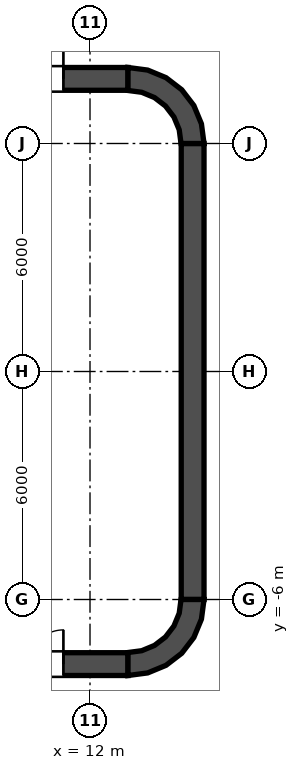
"""IFC4 building model, lengths in metres.
Left out: names, types, materials, properties, quantities, classifications, styles, units other than length and angle.
Written with IfcOpenShell. Run it as: python <this file> out.ifc"""

import sys

from ifc_helpers import new_model, si_unit, direction, frame, frame_2d, origin, place, context, subcontext, project, spatial, polyline, rectangle, outline, extrude, element, fill, save


model = new_model("IFC4")
c1 = context("Model", 3, precision=1e-05, world=origin(), true_north=direction((0.0, 1.0)))
c2 = subcontext(c1, "Body", "Model", "MODEL_VIEW")
j1 = project(units=[si_unit("LENGTHUNIT", "METRE"), si_unit("PLANEANGLEUNIT", "RADIAN")], contexts=[c1])
p1 = place(None, origin())
s1 = spatial("IfcSite", under=j1, at=p1, CompositionType="ELEMENT")
p2 = place(p1, origin())
s2 = spatial("IfcBuilding", under=s1, at=p2, CompositionType="ELEMENT")
p3 = place(p2, frame((0.0, 0.0, 44.0)))
s3 = spatial("IfcBuildingStorey", under=s2, at=p3, CompositionType="ELEMENT", Elevation=44.0)
p4 = place(p3, frame((-13.0, 7.7, 0.0), z_axis=(0.0, 0.0, 1.0), x_axis=(1.0, 0.0, 0.0)))
e1 = element("IfcWall", 1, at=p4, inside=s3, PredefinedType="SHEAR", context=c2, shape_type="SweptSolid", body=[
    extrude(rectangle(XDim=26.0, YDim=0.6, at=frame_2d((13.0, 0.0))), origin(), (0.0, 0.0, 1.0), 6.4),
])
p5 = place(p4, frame((1.7, 0.0, 0.0)))
e2 = element("IfcOpeningElement", 2, at=p5, cuts=e1, PredefinedType="OPENING", context=c2, shape_type="SweptSolid", body=[
    extrude(rectangle(XDim=1.8, YDim=2.1, at=frame_2d((0.9, 1.05))), frame((0.0, 0.3, 0.0), z_axis=(0.0, -1.0, 0.0), x_axis=(1.0, 0.0, 0.0)), (0.0, 0.0, 1.0), 0.6),
])
p6 = place(p4, frame((22.5, 0.0, 0.0)))
e3 = element("IfcOpeningElement", 3, at=p6, cuts=e1, PredefinedType="OPENING", context=c2, shape_type="SweptSolid", body=[
    extrude(rectangle(XDim=1.8, YDim=2.1, at=frame_2d((0.9, 1.05))), frame((0.0, 0.3, 0.0), z_axis=(0.0, -1.0, 0.0), x_axis=(1.0, 0.0, 0.0)), (0.0, 0.0, 1.0), 0.6),
])
p7 = place(p3, frame((-13.0, -7.7, 0.0), z_axis=(0.0, 0.0, 1.0), x_axis=(1.0, 0.0, 0.0)))
e4 = element("IfcWall", 4, at=p7, inside=s3, PredefinedType="SHEAR", context=c2, shape_type="SweptSolid", body=[
    extrude(rectangle(XDim=26.0, YDim=0.6, at=frame_2d((13.0, 0.0))), origin(), (0.0, 0.0, 1.0), 6.4),
])
p8 = place(p7, frame((1.7, 0.0, 0.0)))
e5 = element("IfcOpeningElement", 5, at=p8, cuts=e4, PredefinedType="OPENING", context=c2, shape_type="SweptSolid", body=[
    extrude(rectangle(XDim=1.8, YDim=2.1, at=frame_2d((0.9, 1.05))), frame((0.0, 0.3, 0.0), z_axis=(0.0, -1.0, 0.0), x_axis=(1.0, 0.0, 0.0)), (0.0, 0.0, 1.0), 0.6),
])
p9 = place(p7, frame((22.5, 0.0, 0.0)))
e6 = element("IfcOpeningElement", 6, at=p9, cuts=e4, PredefinedType="OPENING", context=c2, shape_type="SweptSolid", body=[
    extrude(rectangle(XDim=1.8, YDim=2.1, at=frame_2d((0.9, 1.05))), frame((0.0, 0.3, 0.0), z_axis=(0.0, -1.0, 0.0), x_axis=(1.0, 0.0, 0.0)), (0.0, 0.0, 1.0), 0.6),
])
p10 = place(p3, frame((14.7, -6.0, 0.0), z_axis=(0.0, 0.0, 1.0), x_axis=(0.0, 1.0, 0.0)))
e7 = element("IfcWall", 7, at=p10, inside=s3, PredefinedType="SHEAR", context=c2, shape_type="SweptSolid", body=[
    extrude(rectangle(XDim=12.0, YDim=0.6, at=frame_2d((6.0, 0.0))), origin(), (0.0, 0.0, 1.0), 6.4),
])
p11 = place(p3, origin())
e8 = element("IfcWall", 8, at=p11, inside=s3, PredefinedType="SHEAR", context=c2, shape_type="SweptSolid", body=[
    extrude(outline(polyline([(13.0, 8.0), (13.0, 7.395), (13.361, 7.347), (13.698, 7.208), (13.986, 6.986), (14.208, 6.698), (14.347, 6.361), (14.395, 6.0), (15.0, 6.0), (14.932, 6.518), (14.732, 7.0), (14.414, 7.414), (14.0, 7.732), (13.518, 7.932), (13.0, 8.0)])), origin(), (0.0, 0.0, 1.0), 6.4),
])
e9 = element("IfcWall", 9, at=p11, inside=s3, PredefinedType="SHEAR", context=c2, shape_type="SweptSolid", body=[
    extrude(outline(polyline([(15.0, -6.0), (14.395, -6.0), (14.347, -6.361), (14.208, -6.698), (13.986, -6.986), (13.698, -7.208), (13.361, -7.347), (13.0, -7.395), (13.0, -8.0), (13.518, -7.932), (14.0, -7.732), (14.414, -7.414), (14.732, -7.0), (14.932, -6.518), (15.0, -6.0)])), origin(), (0.0, 0.0, 1.0), 6.4),
])
p12 = place(p3, frame((11.8, -7.4, 0.0), z_axis=(0.0, 0.0, 1.0), x_axis=(0.0, 1.0, 0.0)))
e10 = element("IfcWall", 10, at=p12, inside=s3, PredefinedType="SOLIDWALL", context=c2, shape_type="SweptSolid", body=[
    extrude(rectangle(XDim=14.8, YDim=0.4, at=frame_2d((7.4, 0.0))), origin(), (0.0, 0.0, 1.0), 6.25),
])
p13 = place(p12, frame((13.552, 0.0, 0.0)))
e11 = element("IfcOpeningElement", 11, at=p13, cuts=e10, PredefinedType="OPENING", context=c2, shape_type="SweptSolid", body=[
    extrude(rectangle(XDim=0.9, YDim=2.1, at=frame_2d((0.45, 1.05))), frame((0.0, 0.2, 0.0), z_axis=(0.0, -1.0, 0.0), x_axis=(1.0, 0.0, 0.0)), (0.0, 0.0, 1.0), 0.4),
])
p14 = place(p12, frame((0.347, 0.0, 0.0)))
e12 = element("IfcOpeningElement", 12, at=p14, cuts=e10, PredefinedType="OPENING", context=c2, shape_type="SweptSolid", body=[
    extrude(rectangle(XDim=0.9, YDim=2.1, at=frame_2d((0.45, 1.05))), frame((0.0, 0.2, 0.0), z_axis=(0.0, -1.0, 0.0), x_axis=(1.0, 0.0, 0.0)), (0.0, 0.0, 1.0), 0.4),
])
e13 = element("IfcWall", 13, at=p11, inside=s3, PredefinedType="SOLIDWALL", context=c2, shape_type="SweptSolid", body=[
    extrude(outline(polyline([(12.0, -5.675), (12.0, -5.925), (14.15, -5.925), (14.4, -5.925), (14.4, -5.675), (14.4, -3.025), (14.4, -2.775), (14.4, -0.125), (14.4, 0.125), (14.4, 2.775), (14.4, 3.025), (14.4, 5.675), (14.4, 5.925), (14.15, 5.925), (12.0, 5.925), (12.0, 5.675), (14.15, 5.675), (14.15, 3.025), (12.0, 3.025), (12.0, 2.775), (14.15, 2.775), (14.15, 0.125), (12.0, 0.125), (12.0, -0.125), (14.15, -0.125), (14.15, -2.775), (12.0, -2.775), (12.0, -3.025), (14.15, -3.025), (14.15, -5.675), (12.0, -5.675)])), origin(), (0.0, 0.0, 1.0), 6.25),
])
p15 = place(p13, origin())
e14 = element("IfcDoor", 14, at=p15, inside=s3, OperationType="SINGLE_SWING_RIGHT", PredefinedType="DOOR", context=c2, shape_type="SweptSolid", body=[
    extrude(rectangle(XDim=0.9, YDim=2.1, at=frame_2d((0.45, 1.05))), frame((0.0, 0.025, 0.0), z_axis=(0.0, -1.0, 0.0), x_axis=(1.0, 0.0, 0.0)), (0.0, 0.0, 1.0), 0.05),
])
fill(e11, e14)
p16 = place(p14, origin())
e15 = element("IfcDoor", 15, at=p16, inside=s3, OperationType="SINGLE_SWING_RIGHT", PredefinedType="DOOR", context=c2, shape_type="SweptSolid", body=[
    extrude(rectangle(XDim=0.9, YDim=2.1, at=frame_2d((0.45, 1.05))), frame((0.0, 0.025, 0.0), z_axis=(0.0, -1.0, 0.0), x_axis=(1.0, 0.0, 0.0)), (0.0, 0.0, 1.0), 0.05),
])
fill(e12, e15)
p17 = place(p6, origin())
e16 = element("IfcDoor", 16, at=p17, inside=s3, OperationType="DOUBLE_DOOR_SINGLE_SWING", PredefinedType="DOOR", context=c2, shape_type="SweptSolid", body=[
    extrude(rectangle(XDim=1.8, YDim=2.1, at=frame_2d((0.9, 1.05))), frame((0.0, 0.025, 0.0), z_axis=(0.0, -1.0, 0.0), x_axis=(1.0, 0.0, 0.0)), (0.0, 0.0, 1.0), 0.05),
])
fill(e3, e16)
p18 = place(p9, origin())
e17 = element("IfcDoor", 17, at=p18, inside=s3, OperationType="DOUBLE_DOOR_SINGLE_SWING", PredefinedType="DOOR", context=c2, shape_type="SweptSolid", body=[
    extrude(rectangle(XDim=1.8, YDim=2.1, at=frame_2d((0.9, 1.05))), frame((0.0, 0.025, 0.0), z_axis=(0.0, -1.0, 0.0), x_axis=(1.0, 0.0, 0.0)), (0.0, 0.0, 1.0), 0.05),
])
fill(e6, e17)
save(model, sys.argv[1])
